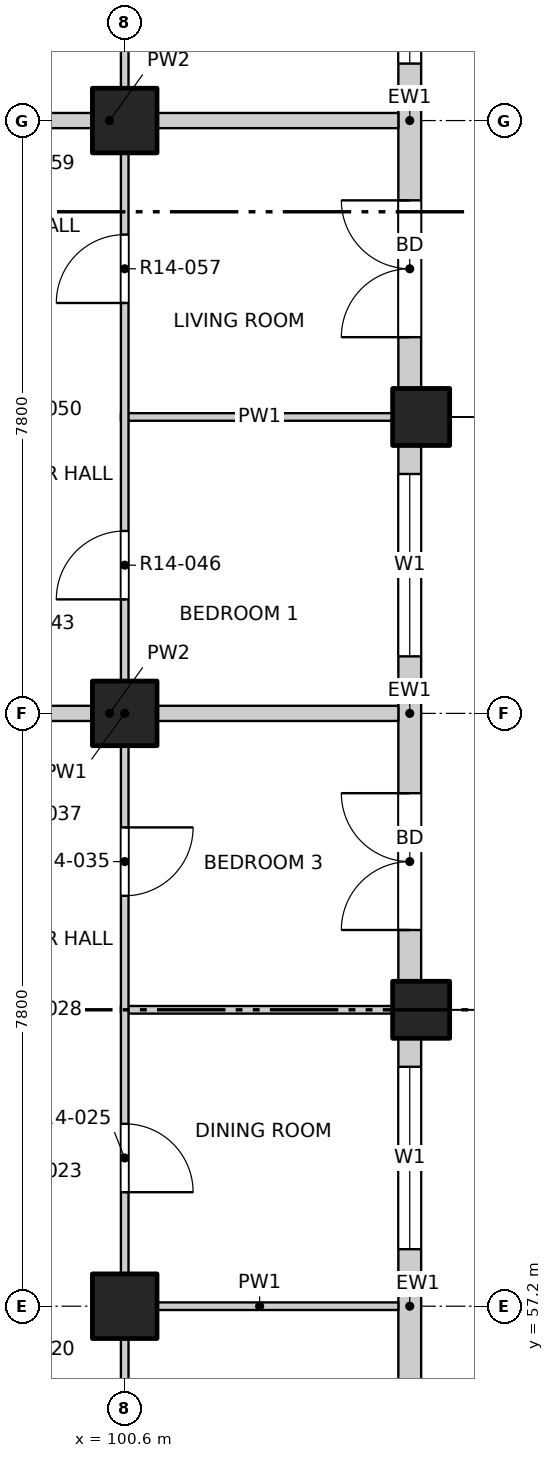
"""IFC4 building model, lengths in metres.
Left out: names, types, materials, properties, quantities, classifications, styles, units other than length and angle.
Written with IfcOpenShell. Run it as: python <this file> out.ifc"""

import sys

from ifc_helpers import new_model, si_unit, direction, frame, frame_2d, origin, origin_2d, place, context, subcontext, project, spatial, rectangle, extrude, element, fill, save


model = new_model("IFC4")
c1 = context("Model", 3, precision=1e-05, world=origin(), true_north=direction((0.0, 1.0)))
c2 = subcontext(c1, "Body", "Model", "MODEL_VIEW")
j1 = project(units=[si_unit("LENGTHUNIT", "METRE"), si_unit("PLANEANGLEUNIT", "RADIAN")], contexts=[c1])
p1 = place(None, origin())
s1 = spatial("IfcSite", under=j1, at=p1, CompositionType="ELEMENT")
p2 = place(p1, origin())
s2 = spatial("IfcBuilding", under=s1, at=p2, CompositionType="ELEMENT")
p3 = place(p2, frame((0.0, 0.0, 152.0)))
s3 = spatial("IfcBuildingStorey", under=s2, at=p3, CompositionType="ELEMENT", Elevation=152.0)
for number, where, z_axis, x_axis in (
    (1, (104.5, 61.1, -0.25), (0.0, 0.0, 1.0), (1.0, 0.0, 0.0)),
    (2, (104.5, 68.9, -0.25), (0.0, 0.0, 1.0), (1.0, 0.0, 0.0)),
):
    element("IfcColumn", number, at=place(p3, frame(where, z_axis=z_axis, x_axis=x_axis)), inside=s3, PredefinedType="COLUMN", context=c2, shape_type="SweptSolid", body=[
        extrude(rectangle(XDim=0.75, YDim=0.75, at=origin_2d()), origin(), (0.0, 0.0, 1.0), 3.4),
    ])
for number, where, z_axis, x_axis in (
    (3, (100.6, 57.2, -0.25), (0.0, 0.0, 1.0), (1.0, 0.0, 0.0)),
    (4, (100.6, 65.0, -0.25), (0.0, 0.0, 1.0), (1.0, 0.0, 0.0)),
    (5, (100.6, 72.8, -0.25), (0.0, 0.0, 1.0), (1.0, 0.0, 0.0)),
):
    element("IfcColumn", number, at=place(p3, frame(where, z_axis=z_axis, x_axis=x_axis)), inside=s3, PredefinedType="COLUMN", context=c2, shape_type="SweptSolid", body=[
        extrude(rectangle(XDim=0.85, YDim=0.85, at=origin_2d()), origin(), (0.0, 0.0, 1.0), 3.4),
    ])
p4 = place(p3, frame((104.35, 53.675, 0.0), z_axis=(0.0, 0.0, 1.0), x_axis=(0.0, 1.0, 0.0)))
e6 = element("IfcWall", 6, at=p4, inside=s3, PredefinedType="SOLIDWALL", context=c2, shape_type="SweptSolid", body=[
    extrude(rectangle(XDim=7.05, YDim=0.3, at=frame_2d((3.525, 0.0))), origin(), (0.0, 0.0, 1.0), 2.7),
])
p5 = place(p4, frame((0.675, 0.0, 0.0)))
e7 = element("IfcOpeningElement", 7, at=p5, cuts=e6, PredefinedType="OPENING", context=c2, shape_type="SweptSolid", body=[
    extrude(rectangle(XDim=1.8, YDim=2.4, at=frame_2d((0.9, 1.2))), frame((0.0, 0.16, 0.0), z_axis=(0.0, -1.0, 0.0), x_axis=(1.0, 0.0, 0.0)), (0.0, 0.0, 1.0), 0.32),
])
p6 = place(p4, frame((4.275, 0.0, 0.9)))
e8 = element("IfcOpeningElement", 8, at=p6, cuts=e6, PredefinedType="OPENING", context=c2, shape_type="SweptSolid", body=[
    extrude(rectangle(XDim=2.4, YDim=1.8, at=frame_2d((1.2, 0.9))), frame((0.0, 0.16, 0.0), z_axis=(0.0, -1.0, 0.0), x_axis=(1.0, 0.0, 0.0)), (0.0, 0.0, 1.0), 0.32),
])
p7 = place(p3, frame((104.35, 61.475, 0.0), z_axis=(0.0, 0.0, 1.0), x_axis=(0.0, 1.0, 0.0)))
e9 = element("IfcWall", 9, at=p7, inside=s3, PredefinedType="SOLIDWALL", context=c2, shape_type="SweptSolid", body=[
    extrude(rectangle(XDim=7.05, YDim=0.3, at=frame_2d((3.525, 0.0))), origin(), (0.0, 0.0, 1.0), 2.7),
])
p8 = place(p7, frame((0.675, 0.0, 0.0)))
e10 = element("IfcOpeningElement", 10, at=p8, cuts=e9, PredefinedType="OPENING", context=c2, shape_type="SweptSolid", body=[
    extrude(rectangle(XDim=1.8, YDim=2.4, at=frame_2d((0.9, 1.2))), frame((0.0, 0.16, 0.0), z_axis=(0.0, -1.0, 0.0), x_axis=(1.0, 0.0, 0.0)), (0.0, 0.0, 1.0), 0.32),
])
p9 = place(p7, frame((4.275, 0.0, 0.9)))
e11 = element("IfcOpeningElement", 11, at=p9, cuts=e9, PredefinedType="OPENING", context=c2, shape_type="SweptSolid", body=[
    extrude(rectangle(XDim=2.4, YDim=1.8, at=frame_2d((1.2, 0.9))), frame((0.0, 0.16, 0.0), z_axis=(0.0, -1.0, 0.0), x_axis=(1.0, 0.0, 0.0)), (0.0, 0.0, 1.0), 0.32),
])
p10 = place(p3, frame((104.35, 69.275, 0.0), z_axis=(0.0, 0.0, 1.0), x_axis=(0.0, 1.0, 0.0)))
e12 = element("IfcWall", 12, at=p10, inside=s3, PredefinedType="SOLIDWALL", context=c2, shape_type="SweptSolid", body=[
    extrude(rectangle(XDim=7.05, YDim=0.3, at=frame_2d((3.525, 0.0))), origin(), (0.0, 0.0, 1.0), 2.7),
])
p11 = place(p10, frame((0.675, 0.0, 0.0)))
e13 = element("IfcOpeningElement", 13, at=p11, cuts=e12, PredefinedType="OPENING", context=c2, shape_type="SweptSolid", body=[
    extrude(rectangle(XDim=1.8, YDim=2.4, at=frame_2d((0.9, 1.2))), frame((0.0, 0.16, 0.0), z_axis=(0.0, -1.0, 0.0), x_axis=(1.0, 0.0, 0.0)), (0.0, 0.0, 1.0), 0.32),
])
p12 = place(p10, frame((4.275, 0.0, 0.9)))
e14 = element("IfcOpeningElement", 14, at=p12, cuts=e12, PredefinedType="OPENING", context=c2, shape_type="SweptSolid", body=[
    extrude(rectangle(XDim=2.4, YDim=1.8, at=frame_2d((1.2, 0.9))), frame((0.0, 0.16, 0.0), z_axis=(0.0, -1.0, 0.0), x_axis=(1.0, 0.0, 0.0)), (0.0, 0.0, 1.0), 0.32),
])
p13 = place(p3, frame((100.55, 57.2, 0.0), z_axis=(0.0, 0.0, 1.0), x_axis=(1.0, 0.0, 0.0)))
e15 = element("IfcWall", 15, at=p13, inside=s3, PredefinedType="PARTITIONING", context=c2, shape_type="SweptSolid", body=[
    extrude(rectangle(XDim=3.65, YDim=0.1, at=frame_2d((1.825, 0.0))), origin(), (0.0, 0.0, 1.0), 3.15),
])
p14 = place(p3, frame((100.55, 61.1, 0.0), z_axis=(0.0, 0.0, 1.0), x_axis=(1.0, 0.0, 0.0)))
e16 = element("IfcWall", 16, at=p14, inside=s3, PredefinedType="PARTITIONING", context=c2, shape_type="SweptSolid", body=[
    extrude(rectangle(XDim=3.65, YDim=0.1, at=frame_2d((1.825, 0.0))), origin(), (0.0, 0.0, 1.0), 2.55),
])
p15 = place(p3, frame((96.6, 65.0, 0.0), z_axis=(0.0, 0.0, 1.0), x_axis=(1.0, 0.0, 0.0)))
e17 = element("IfcWall", 17, at=p15, inside=s3, PredefinedType="PARTITIONING", context=c2, shape_type="SweptSolid", body=[
    extrude(rectangle(XDim=7.6, YDim=0.2, at=frame_2d((3.8, 0.0))), origin(), (0.0, 0.0, 1.0), 3.15),
])
p16 = place(p3, frame((100.55, 68.9, 0.0), z_axis=(0.0, 0.0, 1.0), x_axis=(1.0, 0.0, 0.0)))
e18 = element("IfcWall", 18, at=p16, inside=s3, PredefinedType="PARTITIONING", context=c2, shape_type="SweptSolid", body=[
    extrude(rectangle(XDim=3.65, YDim=0.1, at=frame_2d((1.825, 0.0))), origin(), (0.0, 0.0, 1.0), 2.55),
])
p17 = place(p3, frame((96.6, 72.8, 0.0), z_axis=(0.0, 0.0, 1.0), x_axis=(1.0, 0.0, 0.0)))
e19 = element("IfcWall", 19, at=p17, inside=s3, PredefinedType="PARTITIONING", context=c2, shape_type="SweptSolid", body=[
    extrude(rectangle(XDim=7.6, YDim=0.2, at=frame_2d((3.8, 0.0))), origin(), (0.0, 0.0, 1.0), 3.15),
])
p18 = place(p3, frame((100.6, 45.8, 0.0), z_axis=(0.0, 0.0, 1.0), x_axis=(0.0, 1.0, 0.0)))
e20 = element("IfcWall", 20, at=p18, inside=s3, PredefinedType="PARTITIONING", context=c2, shape_type="SweptSolid", body=[
    extrude(rectangle(XDim=38.4, YDim=0.1, at=frame_2d((19.2, 0.0))), origin(), (0.0, 0.0, 1.0), 3.15),
])
p19 = place(p18, frame((1.05, 0.0, 0.0)))
e21 = element("IfcOpeningElement", 21, at=p19, cuts=e20, PredefinedType="OPENING", context=c2, shape_type="SweptSolid", body=[
    extrude(rectangle(XDim=1.2, YDim=2.1, at=frame_2d((0.6, 1.05))), frame((0.0, 0.06, 0.0), z_axis=(0.0, -1.0, 0.0), x_axis=(1.0, 0.0, 0.0)), (0.0, 0.0, 1.0), 0.12),
])
p20 = place(p18, frame((5.1, 0.0, 0.0)))
e22 = element("IfcOpeningElement", 22, at=p20, cuts=e20, PredefinedType="OPENING", context=c2, shape_type="SweptSolid", body=[
    extrude(rectangle(XDim=0.9, YDim=2.1, at=frame_2d((0.45, 1.05))), frame((0.0, 0.06, 0.0), z_axis=(0.0, -1.0, 0.0), x_axis=(1.0, 0.0, 0.0)), (0.0, 0.0, 1.0), 0.12),
])
p21 = place(p18, frame((9.0, 0.0, 0.0)))
e23 = element("IfcOpeningElement", 23, at=p21, cuts=e20, PredefinedType="OPENING", context=c2, shape_type="SweptSolid", body=[
    extrude(rectangle(XDim=0.9, YDim=2.1, at=frame_2d((0.45, 1.05))), frame((0.0, 0.06, 0.0), z_axis=(0.0, -1.0, 0.0), x_axis=(1.0, 0.0, 0.0)), (0.0, 0.0, 1.0), 0.12),
])
p22 = place(p18, frame((12.9, 0.0, 0.0)))
e24 = element("IfcOpeningElement", 24, at=p22, cuts=e20, PredefinedType="OPENING", context=c2, shape_type="SweptSolid", body=[
    extrude(rectangle(XDim=0.9, YDim=2.1, at=frame_2d((0.45, 1.05))), frame((0.0, 0.06, 0.0), z_axis=(0.0, -1.0, 0.0), x_axis=(1.0, 0.0, 0.0)), (0.0, 0.0, 1.0), 0.12),
])
p23 = place(p18, frame((16.8, 0.0, 0.0)))
e25 = element("IfcOpeningElement", 25, at=p23, cuts=e20, PredefinedType="OPENING", context=c2, shape_type="SweptSolid", body=[
    extrude(rectangle(XDim=0.9, YDim=2.1, at=frame_2d((0.45, 1.05))), frame((0.0, 0.06, 0.0), z_axis=(0.0, -1.0, 0.0), x_axis=(1.0, 0.0, 0.0)), (0.0, 0.0, 1.0), 0.12),
])
p24 = place(p18, frame((20.7, 0.0, 0.0)))
e26 = element("IfcOpeningElement", 26, at=p24, cuts=e20, PredefinedType="OPENING", context=c2, shape_type="SweptSolid", body=[
    extrude(rectangle(XDim=0.9, YDim=2.1, at=frame_2d((0.45, 1.05))), frame((0.0, 0.06, 0.0), z_axis=(0.0, -1.0, 0.0), x_axis=(1.0, 0.0, 0.0)), (0.0, 0.0, 1.0), 0.12),
])
p25 = place(p18, frame((24.6, 0.0, 0.0)))
e27 = element("IfcOpeningElement", 27, at=p25, cuts=e20, PredefinedType="OPENING", context=c2, shape_type="SweptSolid", body=[
    extrude(rectangle(XDim=0.9, YDim=2.1, at=frame_2d((0.45, 1.05))), frame((0.0, 0.06, 0.0), z_axis=(0.0, -1.0, 0.0), x_axis=(1.0, 0.0, 0.0)), (0.0, 0.0, 1.0), 0.12),
])
p26 = place(p18, frame((28.5, 0.0, 0.0)))
e28 = element("IfcOpeningElement", 28, at=p26, cuts=e20, PredefinedType="OPENING", context=c2, shape_type="SweptSolid", body=[
    extrude(rectangle(XDim=0.9, YDim=2.1, at=frame_2d((0.45, 1.05))), frame((0.0, 0.06, 0.0), z_axis=(0.0, -1.0, 0.0), x_axis=(1.0, 0.0, 0.0)), (0.0, 0.0, 1.0), 0.12),
])
p27 = place(p18, frame((32.4, 0.0, 0.0)))
e29 = element("IfcOpeningElement", 29, at=p27, cuts=e20, PredefinedType="OPENING", context=c2, shape_type="SweptSolid", body=[
    extrude(rectangle(XDim=0.9, YDim=2.1, at=frame_2d((0.45, 1.05))), frame((0.0, 0.06, 0.0), z_axis=(0.0, -1.0, 0.0), x_axis=(1.0, 0.0, 0.0)), (0.0, 0.0, 1.0), 0.12),
])
p28 = place(p18, frame((36.15, 0.0, 0.0)))
e30 = element("IfcOpeningElement", 30, at=p28, cuts=e20, PredefinedType="OPENING", context=c2, shape_type="SweptSolid", body=[
    extrude(rectangle(XDim=1.2, YDim=2.1, at=frame_2d((0.6, 1.05))), frame((0.0, 0.06, 0.0), z_axis=(0.0, -1.0, 0.0), x_axis=(1.0, 0.0, 0.0)), (0.0, 0.0, 1.0), 0.12),
])
p29 = place(p6, origin())
e31 = element("IfcWindow", 31, at=p29, inside=s3, PartitioningType="DOUBLE_PANEL_VERTICAL", PredefinedType="WINDOW", context=c2, shape_type="SweptSolid", body=[
    extrude(rectangle(XDim=2.4, YDim=1.8, at=frame_2d((1.2, 0.9))), frame((0.0, 0.03, 0.0), z_axis=(0.0, -1.0, 0.0), x_axis=(1.0, 0.0, 0.0)), (0.0, 0.0, 1.0), 0.06),
])
fill(e8, e31)
p30 = place(p8, origin())
e32 = element("IfcDoor", 32, at=p30, inside=s3, OperationType="DOUBLE_DOOR_SINGLE_SWING", PredefinedType="DOOR", context=c2, shape_type="SweptSolid", body=[
    extrude(rectangle(XDim=1.8, YDim=2.4, at=frame_2d((0.9, 1.2))), frame((0.0, 0.025, 0.0), z_axis=(0.0, -1.0, 0.0), x_axis=(1.0, 0.0, 0.0)), (0.0, 0.0, 1.0), 0.05),
])
fill(e10, e32)
p31 = place(p9, origin())
e33 = element("IfcWindow", 33, at=p31, inside=s3, PartitioningType="DOUBLE_PANEL_VERTICAL", PredefinedType="WINDOW", context=c2, shape_type="SweptSolid", body=[
    extrude(rectangle(XDim=2.4, YDim=1.8, at=frame_2d((1.2, 0.9))), frame((0.0, 0.03, 0.0), z_axis=(0.0, -1.0, 0.0), x_axis=(1.0, 0.0, 0.0)), (0.0, 0.0, 1.0), 0.06),
])
fill(e11, e33)
p32 = place(p11, origin())
e34 = element("IfcDoor", 34, at=p32, inside=s3, OperationType="DOUBLE_DOOR_SINGLE_SWING", PredefinedType="DOOR", context=c2, shape_type="SweptSolid", body=[
    extrude(rectangle(XDim=1.8, YDim=2.4, at=frame_2d((0.9, 1.2))), frame((0.0, 0.025, 0.0), z_axis=(0.0, -1.0, 0.0), x_axis=(1.0, 0.0, 0.0)), (0.0, 0.0, 1.0), 0.05),
])
fill(e13, e34)
p33 = place(p12, origin())
e35 = element("IfcWindow", 35, at=p33, inside=s3, PartitioningType="DOUBLE_PANEL_VERTICAL", PredefinedType="WINDOW", context=c2, shape_type="SweptSolid", body=[
    extrude(rectangle(XDim=2.4, YDim=1.8, at=frame_2d((1.2, 0.9))), frame((0.0, 0.03, 0.0), z_axis=(0.0, -1.0, 0.0), x_axis=(1.0, 0.0, 0.0)), (0.0, 0.0, 1.0), 0.06),
])
fill(e14, e35)
p34 = place(p22, origin())
e36 = element("IfcDoor", 36, at=p34, inside=s3, OperationType="SINGLE_SWING_RIGHT", PredefinedType="DOOR", context=c2, shape_type="SweptSolid", body=[
    extrude(rectangle(XDim=0.9, YDim=2.1, at=frame_2d((0.45, 1.05))), frame((0.0, 0.025, 0.0), z_axis=(0.0, -1.0, 0.0), x_axis=(1.0, 0.0, 0.0)), (0.0, 0.0, 1.0), 0.05),
])
fill(e24, e36)
p35 = place(p23, origin())
e37 = element("IfcDoor", 37, at=p35, inside=s3, OperationType="SINGLE_SWING_LEFT", PredefinedType="DOOR", context=c2, shape_type="SweptSolid", body=[
    extrude(rectangle(XDim=0.9, YDim=2.1, at=frame_2d((0.45, 1.05))), frame((0.0, 0.025, 0.0), z_axis=(0.0, -1.0, 0.0), x_axis=(1.0, 0.0, 0.0)), (0.0, 0.0, 1.0), 0.05),
])
fill(e25, e37)
p36 = place(p24, origin())
e38 = element("IfcDoor", 38, at=p36, inside=s3, OperationType="SINGLE_SWING_LEFT", PredefinedType="DOOR", context=c2, shape_type="SweptSolid", body=[
    extrude(rectangle(XDim=0.9, YDim=2.1, at=frame_2d((0.45, 1.05))), frame((0.0, 0.025, 0.0), z_axis=(0.0, -1.0, 0.0), x_axis=(1.0, 0.0, 0.0)), (0.0, 0.0, 1.0), 0.05),
])
fill(e26, e38)
p37 = place(p25, origin())
e39 = element("IfcDoor", 39, at=p37, inside=s3, OperationType="SINGLE_SWING_LEFT", PredefinedType="DOOR", context=c2, shape_type="SweptSolid", body=[
    extrude(rectangle(XDim=0.9, YDim=2.1, at=frame_2d((0.45, 1.05))), frame((0.0, 0.025, 0.0), z_axis=(0.0, -1.0, 0.0), x_axis=(1.0, 0.0, 0.0)), (0.0, 0.0, 1.0), 0.05),
])
fill(e27, e39)
save(model, sys.argv[1])
